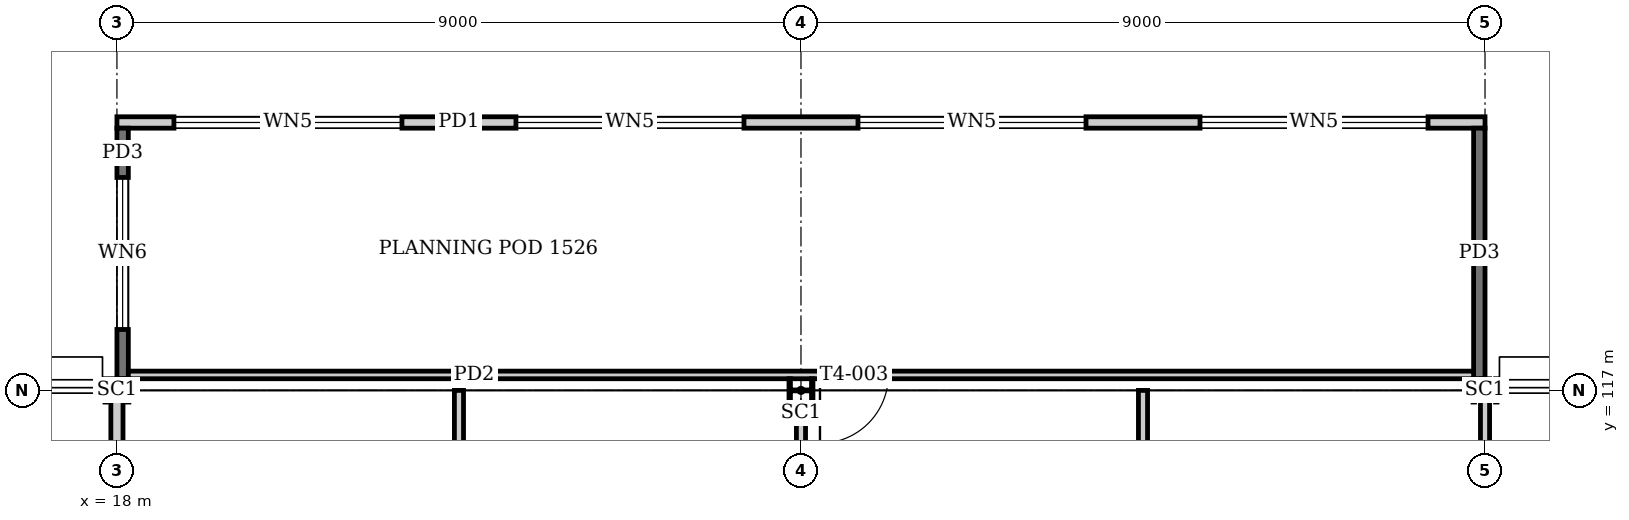
"""IFC4 building model, lengths in metres.
Left out: names, types, materials, properties, quantities, classifications, styles, units other than length and angle.
Written with IfcOpenShell. Run it as: python <this file> out.ifc"""

import sys

from ifc_helpers import new_model, si_unit, direction, frame, frame_2d, origin, origin_2d, place, context, subcontext, project, spatial, rectangle, i_section, extrude, element, fill, save


model = new_model("IFC4")
c1 = context("Model", 3, precision=1e-05, world=origin(), true_north=direction((0.0, 1.0)))
c2 = subcontext(c1, "Body", "Model", "MODEL_VIEW")
j1 = project(units=[si_unit("LENGTHUNIT", "METRE"), si_unit("PLANEANGLEUNIT", "RADIAN")], contexts=[c1])
p1 = place(None, origin())
s1 = spatial("IfcSite", under=j1, at=p1, CompositionType="ELEMENT")
p2 = place(p1, origin())
s2 = spatial("IfcBuilding", under=s1, at=p2, CompositionType="ELEMENT")
p3 = place(p2, frame((0.0, 0.0, 63.2)))
s3 = spatial("IfcBuildingStorey", under=s2, at=p3, CompositionType="ELEMENT", Elevation=63.2)
for number, where, z_axis, x_axis in (
    (1, (18.0, 117.0, 0.0), (0.0, 0.0, 1.0), (0.0, 1.0, 0.0)),
    (2, (27.0, 117.0, 0.0), (0.0, 0.0, 1.0), (0.0, 1.0, 0.0)),
    (3, (36.0, 117.0, 0.0), (0.0, 0.0, 1.0), (0.0, 1.0, 0.0)),
):
    element("IfcColumn", number, at=place(p3, frame(where, z_axis=z_axis, x_axis=x_axis)), inside=s3, PredefinedType="COLUMN", context=c2, shape_type="SweptSolid", body=[
        extrude(i_section(OverallWidth=0.307, OverallDepth=0.315, WebThickness=0.012, FlangeThickness=0.019, at=origin_2d()), origin(), (0.0, 0.0, 1.0), 4.0),
    ])
p4 = place(p3, frame((18.0, 120.525, 0.0), z_axis=(0.0, 0.0, 1.0), x_axis=(1.0, 0.0, 0.0)))
e4 = element("IfcWall", 4, at=p4, inside=s3, PredefinedType="SOLIDWALL", context=c2, shape_type="SweptSolid", body=[
    extrude(rectangle(XDim=18.0, YDim=0.15, at=frame_2d((9.0, 0.0))), origin(), (0.0, 0.0, 1.0), 2.6),
])
p5 = place(p4, frame((0.75, 0.0, 0.9)))
e5 = element("IfcOpeningElement", 5, at=p5, cuts=e4, PredefinedType="OPENING", context=c2, shape_type="SweptSolid", body=[
    extrude(rectangle(XDim=3.0, YDim=1.4, at=frame_2d((1.5, 0.7))), frame((0.0, 0.085, 0.0), z_axis=(0.0, -1.0, 0.0), x_axis=(1.0, 0.0, 0.0)), (0.0, 0.0, 1.0), 0.17),
])
p6 = place(p4, frame((5.25, 0.0, 0.9)))
e6 = element("IfcOpeningElement", 6, at=p6, cuts=e4, PredefinedType="OPENING", context=c2, shape_type="SweptSolid", body=[
    extrude(rectangle(XDim=3.0, YDim=1.4, at=frame_2d((1.5, 0.7))), frame((0.0, 0.085, 0.0), z_axis=(0.0, -1.0, 0.0), x_axis=(1.0, 0.0, 0.0)), (0.0, 0.0, 1.0), 0.17),
])
p7 = place(p4, frame((9.75, 0.0, 0.9)))
e7 = element("IfcOpeningElement", 7, at=p7, cuts=e4, PredefinedType="OPENING", context=c2, shape_type="SweptSolid", body=[
    extrude(rectangle(XDim=3.0, YDim=1.4, at=frame_2d((1.5, 0.7))), frame((0.0, 0.085, 0.0), z_axis=(0.0, -1.0, 0.0), x_axis=(1.0, 0.0, 0.0)), (0.0, 0.0, 1.0), 0.17),
])
p8 = place(p4, frame((14.25, 0.0, 0.9)))
e8 = element("IfcOpeningElement", 8, at=p8, cuts=e4, PredefinedType="OPENING", context=c2, shape_type="SweptSolid", body=[
    extrude(rectangle(XDim=3.0, YDim=1.4, at=frame_2d((1.5, 0.7))), frame((0.0, 0.085, 0.0), z_axis=(0.0, -1.0, 0.0), x_axis=(1.0, 0.0, 0.0)), (0.0, 0.0, 1.0), 0.17),
])
p9 = place(p3, frame((18.075, 120.45, -0.15), z_axis=(0.0, 0.0, 1.0), x_axis=(0.0, -1.0, 0.0)))
e9 = element("IfcWall", 9, at=p9, inside=s3, PredefinedType="SOLIDWALL", context=c2, shape_type="SweptSolid", body=[
    extrude(rectangle(XDim=3.296, YDim=0.15, at=frame_2d((1.648, 0.0))), origin(), (0.0, 0.0, 1.0), 2.75),
])
p10 = place(p9, frame((0.648, 0.0, 1.05)))
e10 = element("IfcOpeningElement", 10, at=p10, cuts=e9, PredefinedType="OPENING", context=c2, shape_type="SweptSolid", body=[
    extrude(rectangle(XDim=2.0, YDim=1.4, at=frame_2d((1.0, 0.7))), frame((0.0, 0.085, 0.0), z_axis=(0.0, -1.0, 0.0), x_axis=(1.0, 0.0, 0.0)), (0.0, 0.0, 1.0), 0.17),
])
p11 = place(p3, frame((35.925, 120.45, -0.15), z_axis=(0.0, 0.0, 1.0), x_axis=(0.0, -1.0, 0.0)))
e11 = element("IfcWall", 11, at=p11, inside=s3, PredefinedType="SOLIDWALL", context=c2, shape_type="SweptSolid", body=[
    extrude(rectangle(XDim=3.296, YDim=0.15, at=frame_2d((1.648, 0.0))), origin(), (0.0, 0.0, 1.0), 2.75),
])
p12 = place(p3, frame((18.15, 117.204, 0.0), z_axis=(0.0, 0.0, 1.0), x_axis=(1.0, 0.0, 0.0)))
e12 = element("IfcWall", 12, at=p12, inside=s3, PredefinedType="PARTITIONING", context=c2, shape_type="SweptSolid", body=[
    extrude(rectangle(XDim=17.7, YDim=0.1, at=frame_2d((8.85, 0.0))), origin(), (0.0, 0.0, 1.0), 2.6),
])
p13 = place(p12, frame((9.1, 0.0, 0.0)))
e13 = element("IfcOpeningElement", 13, at=p13, cuts=e12, PredefinedType="OPENING", context=c2, shape_type="SweptSolid", body=[
    extrude(rectangle(XDim=0.9, YDim=2.1, at=frame_2d((0.45, 1.05))), frame((0.0, 0.06, 0.0), z_axis=(0.0, -1.0, 0.0), x_axis=(1.0, 0.0, 0.0)), (0.0, 0.0, 1.0), 0.12),
])
p14 = place(p3, frame((18.0, 112.6, 0.0), z_axis=(0.0, 0.0, 1.0), x_axis=(0.0, 1.0, 0.0)))
e14 = element("IfcWall", 14, at=p14, inside=s3, PredefinedType="PARTITIONING", context=c2, shape_type="SweptSolid", body=[
    extrude(rectangle(XDim=4.553, YDim=0.16, at=frame_2d((2.277, 0.0))), origin(), (0.0, 0.0, 1.0), 3.05),
])
p15 = place(p3, frame((22.5, 112.6, 0.0), z_axis=(0.0, 0.0, 1.0), x_axis=(0.0, 1.0, 0.0)))
e15 = element("IfcWall", 15, at=p15, inside=s3, PredefinedType="PARTITIONING", context=c2, shape_type="SweptSolid", body=[
    extrude(rectangle(XDim=4.4, YDim=0.12, at=frame_2d((2.2, 0.0))), origin(), (0.0, 0.0, 1.0), 3.05),
])
p16 = place(p3, frame((27.0, 112.6, 0.0), z_axis=(0.0, 0.0, 1.0), x_axis=(0.0, 1.0, 0.0)))
e16 = element("IfcWall", 16, at=p16, inside=s3, PredefinedType="PARTITIONING", context=c2, shape_type="SweptSolid", body=[
    extrude(rectangle(XDim=4.242, YDim=0.12, at=frame_2d((2.121, 0.0))), origin(), (0.0, 0.0, 1.0), 3.05),
])
p17 = place(p3, frame((31.5, 112.6, 0.0), z_axis=(0.0, 0.0, 1.0), x_axis=(0.0, 1.0, 0.0)))
e17 = element("IfcWall", 17, at=p17, inside=s3, PredefinedType="PARTITIONING", context=c2, shape_type="SweptSolid", body=[
    extrude(rectangle(XDim=4.4, YDim=0.12, at=frame_2d((2.2, 0.0))), origin(), (0.0, 0.0, 1.0), 3.05),
])
p18 = place(p3, frame((36.0, 112.6, 0.0), z_axis=(0.0, 0.0, 1.0), x_axis=(0.0, 1.0, 0.0)))
e18 = element("IfcWall", 18, at=p18, inside=s3, PredefinedType="PARTITIONING", context=c2, shape_type="SweptSolid", body=[
    extrude(rectangle(XDim=4.553, YDim=0.12, at=frame_2d((2.277, 0.0))), origin(), (0.0, 0.0, 1.0), 3.05),
])
p19 = place(p5, origin())
e19 = element("IfcWindow", 19, at=p19, inside=s3, PartitioningType="SINGLE_PANEL", PredefinedType="WINDOW", context=c2, shape_type="SweptSolid", body=[
    extrude(rectangle(XDim=3.0, YDim=1.4, at=frame_2d((1.5, 0.7))), frame((0.0, 0.03, 0.0), z_axis=(0.0, -1.0, 0.0), x_axis=(1.0, 0.0, 0.0)), (0.0, 0.0, 1.0), 0.06),
])
fill(e5, e19)
p20 = place(p6, origin())
e20 = element("IfcWindow", 20, at=p20, inside=s3, PartitioningType="SINGLE_PANEL", PredefinedType="WINDOW", context=c2, shape_type="SweptSolid", body=[
    extrude(rectangle(XDim=3.0, YDim=1.4, at=frame_2d((1.5, 0.7))), frame((0.0, 0.03, 0.0), z_axis=(0.0, -1.0, 0.0), x_axis=(1.0, 0.0, 0.0)), (0.0, 0.0, 1.0), 0.06),
])
fill(e6, e20)
p21 = place(p7, origin())
e21 = element("IfcWindow", 21, at=p21, inside=s3, PartitioningType="SINGLE_PANEL", PredefinedType="WINDOW", context=c2, shape_type="SweptSolid", body=[
    extrude(rectangle(XDim=3.0, YDim=1.4, at=frame_2d((1.5, 0.7))), frame((0.0, 0.03, 0.0), z_axis=(0.0, -1.0, 0.0), x_axis=(1.0, 0.0, 0.0)), (0.0, 0.0, 1.0), 0.06),
])
fill(e7, e21)
p22 = place(p8, origin())
e22 = element("IfcWindow", 22, at=p22, inside=s3, PartitioningType="SINGLE_PANEL", PredefinedType="WINDOW", context=c2, shape_type="SweptSolid", body=[
    extrude(rectangle(XDim=3.0, YDim=1.4, at=frame_2d((1.5, 0.7))), frame((0.0, 0.03, 0.0), z_axis=(0.0, -1.0, 0.0), x_axis=(1.0, 0.0, 0.0)), (0.0, 0.0, 1.0), 0.06),
])
fill(e8, e22)
p23 = place(p10, origin())
e23 = element("IfcWindow", 23, at=p23, inside=s3, PartitioningType="SINGLE_PANEL", PredefinedType="WINDOW", context=c2, shape_type="SweptSolid", body=[
    extrude(rectangle(XDim=2.0, YDim=1.4, at=frame_2d((1.0, 0.7))), frame((0.0, 0.03, 0.0), z_axis=(0.0, -1.0, 0.0), x_axis=(1.0, 0.0, 0.0)), (0.0, 0.0, 1.0), 0.06),
])
fill(e10, e23)
p24 = place(p13, frame((0.9, 0.0, 0.0), z_axis=(0.0, 0.0, 1.0), x_axis=(-1.0, 0.0, 0.0)))
e24 = element("IfcDoor", 24, at=p24, inside=s3, OperationType="SINGLE_SWING_RIGHT", PredefinedType="DOOR", context=c2, shape_type="SweptSolid", body=[
    extrude(rectangle(XDim=0.9, YDim=2.1, at=frame_2d((0.45, 1.05))), frame((0.0, 0.025, 0.0), z_axis=(0.0, -1.0, 0.0), x_axis=(1.0, 0.0, 0.0)), (0.0, 0.0, 1.0), 0.05),
])
fill(e13, e24)
save(model, sys.argv[1])
